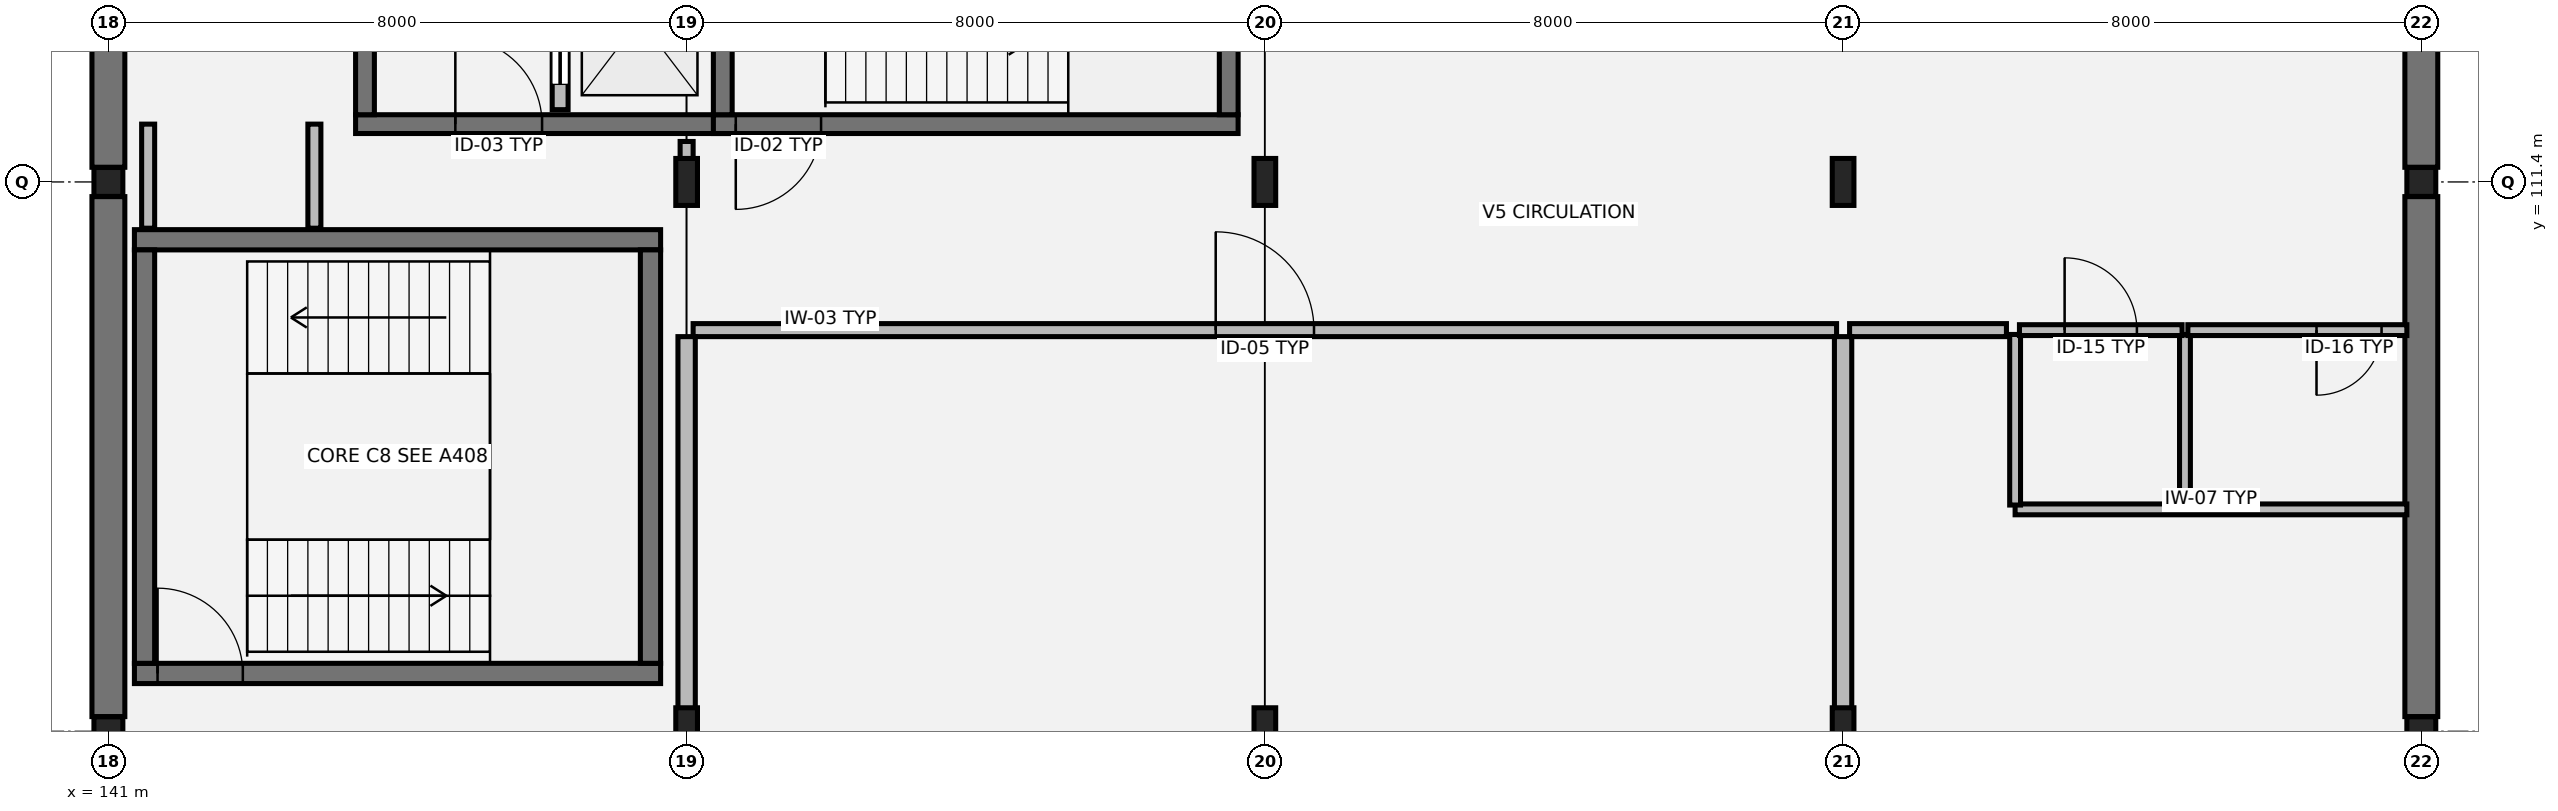
"""IFC4 building model, lengths in metres.
Left out: names, types, materials, properties, quantities, classifications, styles, units other than length and angle.
Written with IfcOpenShell. Run it as: python <this file> out.ifc"""

import sys

from ifc_helpers import new_model, si_unit, direction, frame, frame_2d, origin, origin_2d, place, context, subcontext, project, spatial, rectangle, hollow_rectangle, i_section, extrude, element, fill, save


model = new_model("IFC4")
c1 = context("Model", 3, precision=1e-05, world=origin(), true_north=direction((0.0, 1.0)))
c2 = subcontext(c1, "Body", "Model", "MODEL_VIEW")
j1 = project(units=[si_unit("LENGTHUNIT", "METRE"), si_unit("PLANEANGLEUNIT", "RADIAN")], contexts=[c1])
p1 = place(None, origin())
s1 = spatial("IfcSite", under=j1, at=p1, CompositionType="ELEMENT")
p2 = place(p1, origin())
s2 = spatial("IfcBuilding", under=s1, at=p2, CompositionType="ELEMENT")
p3 = place(p2, frame((0.0, 0.0, -4.42)))
s3 = spatial("IfcBuildingStorey", under=s2, at=p3, CompositionType="ELEMENT", Elevation=-4.42)
for number, where, z_axis, x_axis in (
    (1, (141.0, 103.8, 0.0), (0.0, 0.0, 1.0), (1.0, 0.0, 0.0)),
    (2, (141.0, 111.4, 0.0), (0.0, 0.0, 1.0), (1.0, 0.0, 0.0)),
):
    element("IfcColumn", number, at=place(p3, frame(where, z_axis=z_axis, x_axis=x_axis)), inside=s3, PredefinedType="COLUMN", context=c2, shape_type="SweptSolid", body=[
        extrude(hollow_rectangle(XDim=0.4, YDim=0.4, WallThickness=0.016, at=origin_2d()), origin(), (0.0, 0.0, 1.0), 4.395),
    ])
for number, where, z_axis, x_axis in (
    (3, (149.0, 103.8, 0.0), (0.0, 0.0, 1.0), (1.0, 0.0, 0.0)),
    (4, (149.0, 111.4, 0.0), (0.0, 0.0, 1.0), (1.0, 0.0, 0.0)),
    (5, (157.0, 103.8, 0.0), (0.0, 0.0, 1.0), (1.0, 0.0, 0.0)),
    (6, (157.0, 111.4, 0.0), (0.0, 0.0, 1.0), (1.0, 0.0, 0.0)),
    (7, (165.0, 103.8, 0.0), (0.0, 0.0, 1.0), (1.0, 0.0, 0.0)),
    (8, (165.0, 111.4, 0.0), (0.0, 0.0, 1.0), (1.0, 0.0, 0.0)),
):
    element("IfcColumn", number, at=place(p3, frame(where, z_axis=z_axis, x_axis=x_axis)), inside=s3, PredefinedType="COLUMN", context=c2, shape_type="SweptSolid", body=[
        extrude(i_section(OverallWidth=0.3, OverallDepth=0.65, WebThickness=0.016, FlangeThickness=0.031, at=origin_2d()), origin(), (0.0, 0.0, 1.0), 4.395),
    ])
for number, where, z_axis, x_axis in (
    (9, (173.0, 103.8, 0.0), (0.0, 0.0, 1.0), (1.0, 0.0, 0.0)),
    (10, (173.0, 111.4, 0.0), (0.0, 0.0, 1.0), (1.0, 0.0, 0.0)),
):
    element("IfcColumn", number, at=place(p3, frame(where, z_axis=z_axis, x_axis=x_axis)), inside=s3, PredefinedType="COLUMN", context=c2, shape_type="SweptSolid", body=[
        extrude(hollow_rectangle(XDim=0.4, YDim=0.4, WallThickness=0.016, at=origin_2d()), origin(), (0.0, 0.0, 1.0), 4.395),
    ])
for number, where, z_axis, x_axis in (
    (11, (141.0, 104.003, 0.0), (0.0, 0.0, 1.0), (0.0, 1.0, 0.0)),
    (12, (173.0, 104.003, 0.0), (0.0, 0.0, 1.0), (0.0, 1.0, 0.0)),
    (13, (141.0, 111.603, 0.0), (0.0, 0.0, 1.0), (0.0, 1.0, 0.0)),
    (14, (173.0, 111.603, 0.0), (0.0, 0.0, 1.0), (0.0, 1.0, 0.0)),
):
    element("IfcWall", number, at=place(p3, frame(where, z_axis=z_axis, x_axis=x_axis)), inside=s3, PredefinedType="USERDEFINED", context=c2, shape_type="SweptSolid", body=[
        extrude(rectangle(XDim=7.194, YDim=0.455, at=frame_2d((3.597, 0.0))), origin(), (0.0, 0.0, 1.0), 3.82),
    ])
p4 = place(p3, frame((144.42, 112.2, 0.0), z_axis=(0.0, 0.0, 1.0), x_axis=(1.0, 0.0, 0.0)))
e15 = element("IfcWall", 15, at=p4, inside=s3, PredefinedType="SHEAR", context=c2, shape_type="SweptSolid", body=[
    extrude(rectangle(XDim=5.21, YDim=0.26, at=frame_2d((2.605, 0.0))), origin(), (0.0, 0.0, 1.0), 4.185),
])
p5 = place(p4, frame((1.38, 0.0, 0.0)))
e16 = element("IfcOpeningElement", 16, at=p5, cuts=e15, PredefinedType="OPENING", context=c2, shape_type="SweptSolid", body=[
    extrude(rectangle(XDim=1.2, YDim=2.16, at=frame_2d((0.6, 1.08))), frame((0.0, 0.14, 0.0), z_axis=(0.0, -1.0, 0.0), x_axis=(1.0, 0.0, 0.0)), (0.0, 0.0, 1.0), 0.28),
])
p6 = place(p3, frame((144.55, 118.07, 0.0), z_axis=(0.0, 0.0, 1.0), x_axis=(0.0, -1.0, 0.0)))
e17 = element("IfcWall", 17, at=p6, inside=s3, PredefinedType="SHEAR", context=c2, shape_type="SweptSolid", body=[
    extrude(rectangle(XDim=5.74, YDim=0.26, at=frame_2d((2.87, 0.0))), origin(), (0.0, 0.0, 1.0), 4.185),
])
p7 = place(p3, frame((147.25, 112.4, 0.0), z_axis=(0.0, 0.0, 1.0), x_axis=(0.0, 1.0, 0.0)))
e18 = element("IfcWall", 18, at=p7, inside=s3, PredefinedType="SOLIDWALL", context=c2, shape_type="SweptSolid", body=[
    extrude(rectangle(XDim=5.6, YDim=0.22, at=frame_2d((2.8, 0.0))), origin(), (0.0, 0.0, 1.0), 4.185),
])
p8 = place(p7, frame((0.35, 0.0, 0.0)))
e19 = element("IfcOpeningElement", 19, at=p8, cuts=e18, PredefinedType="OPENING", context=c2, shape_type="SweptSolid", body=[
    extrude(rectangle(XDim=1.1, YDim=2.15, at=frame_2d((0.55, 1.075))), frame((0.0, 0.12, 0.0), z_axis=(0.0, -1.0, 0.0), x_axis=(1.0, 0.0, 0.0)), (0.0, 0.0, 1.0), 0.24),
])
p9 = place(p7, frame((2.4, 0.0, 0.0)))
e20 = element("IfcOpeningElement", 20, at=p9, cuts=e18, PredefinedType="OPENING", context=c2, shape_type="SweptSolid", body=[
    extrude(rectangle(XDim=1.3, YDim=2.18, at=frame_2d((0.65, 1.09))), frame((0.0, 0.12, 0.0), z_axis=(0.0, -1.0, 0.0), x_axis=(1.0, 0.0, 0.0)), (0.0, 0.0, 1.0), 0.24),
])
p10 = place(p3, frame((149.37, 112.2, 0.0), z_axis=(0.0, 0.0, 1.0), x_axis=(1.0, 0.0, 0.0)))
e21 = element("IfcWall", 21, at=p10, inside=s3, PredefinedType="SHEAR", context=c2, shape_type="SweptSolid", body=[
    extrude(rectangle(XDim=7.26, YDim=0.26, at=frame_2d((3.63, 0.0))), origin(), (0.0, 0.0, 1.0), 4.185),
])
p11 = place(p10, frame((0.31, 0.0, 0.0)))
e22 = element("IfcOpeningElement", 22, at=p11, cuts=e21, PredefinedType="OPENING", context=c2, shape_type="SweptSolid", body=[
    extrude(rectangle(XDim=1.18, YDim=2.18, at=frame_2d((0.59, 1.09))), frame((0.0, 0.14, 0.0), z_axis=(0.0, -1.0, 0.0), x_axis=(1.0, 0.0, 0.0)), (0.0, 0.0, 1.0), 0.28),
])
for number, where, z_axis, x_axis in (
    (23, (149.5, 112.33, 0.0), (0.0, 0.0, 1.0), (0.0, 1.0, 0.0)),
    (24, (156.5, 112.33, 0.0), (0.0, 0.0, 1.0), (0.0, 1.0, 0.0)),
):
    element("IfcWall", number, at=place(p3, frame(where, z_axis=z_axis, x_axis=x_axis)), inside=s3, PredefinedType="SHEAR", context=c2, shape_type="SweptSolid", body=[
        extrude(rectangle(XDim=5.74, YDim=0.26, at=frame_2d((2.87, 0.0))), origin(), (0.0, 0.0, 1.0), 4.185),
    ])
p12 = place(p3, frame((141.36, 104.6, 0.0), z_axis=(0.0, 0.0, 1.0), x_axis=(1.0, 0.0, 0.0)))
e25 = element("IfcWall", 25, at=p12, inside=s3, PredefinedType="SHEAR", context=c2, shape_type="SweptSolid", body=[
    extrude(rectangle(XDim=7.28, YDim=0.28, at=frame_2d((3.64, 0.0))), origin(), (0.0, 0.0, 1.0), 4.185),
])
p13 = place(p12, frame((0.32, 0.0, 0.0)))
e26 = element("IfcOpeningElement", 26, at=p13, cuts=e25, PredefinedType="OPENING", context=c2, shape_type="SweptSolid", body=[
    extrude(rectangle(XDim=1.18, YDim=2.18, at=frame_2d((0.59, 1.09))), frame((0.0, 0.15, 0.0), z_axis=(0.0, -1.0, 0.0), x_axis=(1.0, 0.0, 0.0)), (0.0, 0.0, 1.0), 0.3),
])
p14 = place(p3, frame((141.36, 110.6, 0.0), z_axis=(0.0, 0.0, 1.0), x_axis=(1.0, 0.0, 0.0)))
e27 = element("IfcWall", 27, at=p14, inside=s3, PredefinedType="SHEAR", context=c2, shape_type="SweptSolid", body=[
    extrude(rectangle(XDim=7.28, YDim=0.28, at=frame_2d((3.64, 0.0))), origin(), (0.0, 0.0, 1.0), 4.185),
])
for number, where, z_axis, x_axis in (
    (28, (141.5, 104.74, 0.0), (0.0, 0.0, 1.0), (0.0, 1.0, 0.0)),
    (29, (148.5, 104.74, 0.0), (0.0, 0.0, 1.0), (0.0, 1.0, 0.0)),
):
    element("IfcWall", number, at=place(p3, frame(where, z_axis=z_axis, x_axis=x_axis)), inside=s3, PredefinedType="SHEAR", context=c2, shape_type="SweptSolid", body=[
        extrude(rectangle(XDim=5.72, YDim=0.28, at=frame_2d((2.86, 0.0))), origin(), (0.0, 0.0, 1.0), 4.185),
    ])
p15 = place(p3, frame((167.38, 106.87, 0.0), z_axis=(0.0, 0.0, 1.0), x_axis=(1.0, 0.0, 0.0)))
e30 = element("IfcWall", 30, at=p15, inside=s3, PredefinedType="PARTITIONING", context=c2, shape_type="SweptSolid", body=[
    extrude(rectangle(XDim=5.42, YDim=0.15, at=frame_2d((2.71, 0.0))), origin(), (0.0, 0.0, 1.0), 3.52),
])
for number, where, z_axis, x_axis in (
    (31, (167.38, 106.93, 0.0), (0.0, 0.0, 1.0), (0.0, 1.0, 0.0)),
    (32, (169.73, 106.93, 0.0), (0.0, 0.0, 1.0), (0.0, 1.0, 0.0)),
):
    element("IfcWall", number, at=place(p3, frame(where, z_axis=z_axis, x_axis=x_axis)), inside=s3, PredefinedType="PARTITIONING", context=c2, shape_type="SweptSolid", body=[
        extrude(rectangle(XDim=2.36, YDim=0.15, at=frame_2d((1.18, 0.0))), origin(), (0.0, 0.0, 1.0), 3.52),
    ])
p16 = place(p3, frame((167.44, 109.35, 0.0), z_axis=(0.0, 0.0, 1.0), x_axis=(1.0, 0.0, 0.0)))
e33 = element("IfcWall", 33, at=p16, inside=s3, PredefinedType="PARTITIONING", context=c2, shape_type="SweptSolid", body=[
    extrude(rectangle(XDim=2.25, YDim=0.15, at=frame_2d((1.125, 0.0))), origin(), (0.0, 0.0, 1.0), 3.52),
])
p17 = place(p16, frame((0.625, 0.0, 0.0)))
e34 = element("IfcOpeningElement", 34, at=p17, cuts=e33, PredefinedType="OPENING", context=c2, shape_type="SweptSolid", body=[
    extrude(rectangle(XDim=1.0, YDim=2.15, at=frame_2d((0.5, 1.075))), frame((0.0, 0.085, 0.0), z_axis=(0.0, -1.0, 0.0), x_axis=(1.0, 0.0, 0.0)), (0.0, 0.0, 1.0), 0.17),
])
p18 = place(p3, frame((169.77, 109.35, 0.0), z_axis=(0.0, 0.0, 1.0), x_axis=(1.0, 0.0, 0.0)))
e35 = element("IfcWall", 35, at=p18, inside=s3, PredefinedType="PARTITIONING", context=c2, shape_type="SweptSolid", body=[
    extrude(rectangle(XDim=3.03, YDim=0.15, at=frame_2d((1.515, 0.0))), origin(), (0.0, 0.0, 1.0), 3.52),
])
p19 = place(p18, frame((1.78, 0.0, 0.0)))
e36 = element("IfcOpeningElement", 36, at=p19, cuts=e35, PredefinedType="OPENING", context=c2, shape_type="SweptSolid", body=[
    extrude(rectangle(XDim=0.9, YDim=2.15, at=frame_2d((0.45, 1.075))), frame((0.0, 0.085, 0.0), z_axis=(0.0, -1.0, 0.0), x_axis=(1.0, 0.0, 0.0)), (0.0, 0.0, 1.0), 0.17),
])
p20 = place(p3, frame((149.09, 109.35, 0.0), z_axis=(0.0, 0.0, 1.0), x_axis=(1.0, 0.0, 0.0)))
e37 = element("IfcWall", 37, at=p20, inside=s3, PredefinedType="PARTITIONING", context=c2, shape_type="SweptSolid", body=[
    extrude(rectangle(XDim=15.82, YDim=0.18, at=frame_2d((7.91, 0.0))), origin(), (0.0, 0.0, 1.0), 3.52),
])
p21 = place(p20, frame((7.23, 0.0, 0.0)))
e38 = element("IfcOpeningElement", 38, at=p21, cuts=e37, PredefinedType="OPENING", context=c2, shape_type="SweptSolid", body=[
    extrude(rectangle(XDim=1.36, YDim=2.2, at=frame_2d((0.68, 1.1))), frame((0.0, 0.1, 0.0), z_axis=(0.0, -1.0, 0.0), x_axis=(1.0, 0.0, 0.0)), (0.0, 0.0, 1.0), 0.2),
])
p22 = place(p3, frame((165.09, 109.35, 0.0), z_axis=(0.0, 0.0, 1.0), x_axis=(1.0, 0.0, 0.0)))
e39 = element("IfcWall", 39, at=p22, inside=s3, PredefinedType="PARTITIONING", context=c2, shape_type="SweptSolid", body=[
    extrude(rectangle(XDim=2.17, YDim=0.18, at=frame_2d((1.085, 0.0))), origin(), (0.0, 0.0, 1.0), 3.52),
])
p23 = place(p3, frame((149.0, 111.64, 0.0), z_axis=(0.0, 0.0, 1.0), x_axis=(0.0, 1.0, 0.0)))
e40 = element("IfcWall", 40, at=p23, inside=s3, PredefinedType="PARTITIONING", context=c2, shape_type="SweptSolid", body=[
    extrude(rectangle(XDim=0.32, YDim=0.18, at=frame_2d((0.16, 0.0))), origin(), (0.0, 0.0, 1.0), 3.52),
])
for number, where, z_axis, x_axis in (
    (41, (141.55, 110.76, 0.0), (0.0, 0.0, 1.0), (0.0, 1.0, 0.0)),
    (42, (143.85, 110.76, 0.0), (0.0, 0.0, 1.0), (0.0, 1.0, 0.0)),
):
    element("IfcWall", number, at=place(p3, frame(where, z_axis=z_axis, x_axis=x_axis)), inside=s3, PredefinedType="PARTITIONING", context=c2, shape_type="SweptSolid", body=[
        extrude(rectangle(XDim=1.44, YDim=0.18, at=frame_2d((0.72, 0.0))), origin(), (0.0, 0.0, 1.0), 3.52),
    ])
p24 = place(p3, frame((149.0, 73.72, 0.0), z_axis=(0.0, 0.0, 1.0), x_axis=(0.0, 1.0, 0.0)))
e43 = element("IfcWall", 43, at=p24, inside=s3, PredefinedType="SOLIDWALL", context=c2, shape_type="SweptSolid", body=[
    extrude(rectangle(XDim=35.54, YDim=0.24, at=frame_2d((17.77, 0.0))), origin(), (0.0, 0.0, 1.0), 3.52),
])
p25 = place(p24, frame((16.97, 0.0, 0.0)))
e44 = element("IfcOpeningElement", 44, at=p25, cuts=e43, PredefinedType="OPENING", context=c2, shape_type="SweptSolid", body=[
    extrude(rectangle(XDim=1.6, YDim=2.25, at=frame_2d((0.8, 1.125))), frame((0.0, 0.13, 0.0), z_axis=(0.0, -1.0, 0.0), x_axis=(1.0, 0.0, 0.0)), (0.0, 0.0, 1.0), 0.26),
])
p26 = place(p3, frame((165.0, 73.72, 0.0), z_axis=(0.0, 0.0, 1.0), x_axis=(0.0, 1.0, 0.0)))
e45 = element("IfcWall", 45, at=p26, inside=s3, PredefinedType="SOLIDWALL", context=c2, shape_type="SweptSolid", body=[
    extrude(rectangle(XDim=35.54, YDim=0.24, at=frame_2d((17.77, 0.0))), origin(), (0.0, 0.0, 1.0), 3.52),
])
p27 = place(p26, frame((17.12, 0.0, 0.0)))
e46 = element("IfcOpeningElement", 46, at=p27, cuts=e45, PredefinedType="OPENING", context=c2, shape_type="SweptSolid", body=[
    extrude(rectangle(XDim=1.3, YDim=2.2, at=frame_2d((0.65, 1.1))), frame((0.0, 0.13, 0.0), z_axis=(0.0, -1.0, 0.0), x_axis=(1.0, 0.0, 0.0)), (0.0, 0.0, 1.0), 0.26),
])
p28 = place(p5, origin())
e47 = element("IfcDoor", 47, at=p28, inside=s3, OperationType="SINGLE_SWING_LEFT", PredefinedType="DOOR", context=c2, shape_type="SweptSolid", body=[
    extrude(rectangle(XDim=1.2, YDim=2.16, at=frame_2d((0.6, 1.08))), frame((0.0, 0.025, 0.0), z_axis=(0.0, -1.0, 0.0), x_axis=(1.0, 0.0, 0.0)), (0.0, 0.0, 1.0), 0.05),
])
fill(e16, e47)
p29 = place(p8, origin())
e48 = element("IfcDoor", 48, at=p29, inside=s3, OperationType="SLIDING_TO_LEFT", PredefinedType="DOOR", context=c2, shape_type="SweptSolid", body=[
    extrude(rectangle(XDim=1.1, YDim=2.15, at=frame_2d((0.55, 1.075))), frame((0.0, 0.025, 0.0), z_axis=(0.0, -1.0, 0.0), x_axis=(1.0, 0.0, 0.0)), (0.0, 0.0, 1.0), 0.05),
])
fill(e19, e48)
p30 = place(p11, origin())
e49 = element("IfcDoor", 49, at=p30, inside=s3, OperationType="SINGLE_SWING_RIGHT", PredefinedType="DOOR", context=c2, shape_type="SweptSolid", body=[
    extrude(rectangle(XDim=1.18, YDim=2.18, at=frame_2d((0.59, 1.09))), frame((0.0, 0.025, 0.0), z_axis=(0.0, -1.0, 0.0), x_axis=(1.0, 0.0, 0.0)), (0.0, 0.0, 1.0), 0.05),
])
fill(e22, e49)
p31 = place(p13, origin())
e50 = element("IfcDoor", 50, at=p31, inside=s3, OperationType="SINGLE_SWING_LEFT", PredefinedType="DOOR", context=c2, shape_type="SweptSolid", body=[
    extrude(rectangle(XDim=1.18, YDim=2.18, at=frame_2d((0.59, 1.09))), frame((0.0, 0.025, 0.0), z_axis=(0.0, -1.0, 0.0), x_axis=(1.0, 0.0, 0.0)), (0.0, 0.0, 1.0), 0.05),
])
fill(e26, e50)
p32 = place(p17, origin())
e51 = element("IfcDoor", 51, at=p32, inside=s3, OperationType="SINGLE_SWING_LEFT", PredefinedType="DOOR", context=c2, shape_type="SweptSolid", body=[
    extrude(rectangle(XDim=1.0, YDim=2.15, at=frame_2d((0.5, 1.075))), frame((0.0, 0.025, 0.0), z_axis=(0.0, -1.0, 0.0), x_axis=(1.0, 0.0, 0.0)), (0.0, 0.0, 1.0), 0.05),
])
fill(e34, e51)
p33 = place(p19, origin())
e52 = element("IfcDoor", 52, at=p33, inside=s3, OperationType="SINGLE_SWING_RIGHT", PredefinedType="DOOR", context=c2, shape_type="SweptSolid", body=[
    extrude(rectangle(XDim=0.9, YDim=2.15, at=frame_2d((0.45, 1.075))), frame((0.0, 0.025, 0.0), z_axis=(0.0, -1.0, 0.0), x_axis=(1.0, 0.0, 0.0)), (0.0, 0.0, 1.0), 0.05),
])
fill(e36, e52)
p34 = place(p21, origin())
e53 = element("IfcDoor", 53, at=p34, inside=s3, OperationType="SINGLE_SWING_LEFT", PredefinedType="DOOR", context=c2, shape_type="SweptSolid", body=[
    extrude(rectangle(XDim=1.36, YDim=2.2, at=frame_2d((0.68, 1.1))), frame((0.0, 0.025, 0.0), z_axis=(0.0, -1.0, 0.0), x_axis=(1.0, 0.0, 0.0)), (0.0, 0.0, 1.0), 0.05),
])
fill(e38, e53)
save(model, sys.argv[1])
